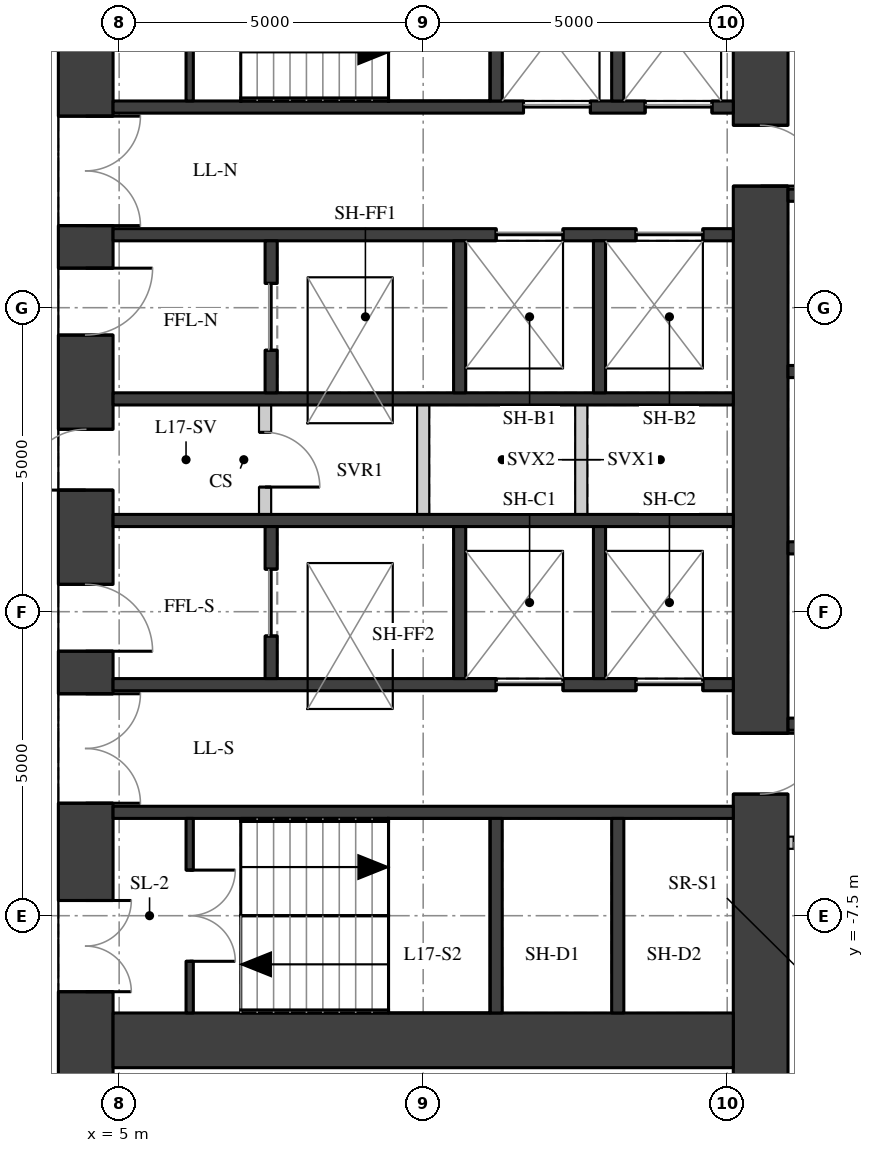
"""IFC4 building model, lengths in metres.
Left out: names, types, materials, properties, quantities, classifications, styles, units other than length and angle.
Written with IfcOpenShell. Run it as: python <this file> out.ifc"""

import sys

from ifc_helpers import new_model, si_unit, direction, frame, frame_2d, origin, place, context, subcontext, project, spatial, rectangle, extrude, element, fill, save


model = new_model("IFC4")
c1 = context("Model", 3, precision=1e-05, world=origin(), true_north=direction((0.0, 1.0)))
c2 = subcontext(c1, "Body", "Model", "MODEL_VIEW")
j1 = project(units=[si_unit("LENGTHUNIT", "METRE"), si_unit("PLANEANGLEUNIT", "RADIAN")], contexts=[c1])
p1 = place(None, origin())
s1 = spatial("IfcSite", under=j1, at=p1, CompositionType="ELEMENT")
p2 = place(p1, origin())
s2 = spatial("IfcBuilding", under=s1, at=p2, CompositionType="ELEMENT")
p3 = place(p2, frame((0.0, 0.0, 64.6)))
s3 = spatial("IfcBuildingStorey", under=s2, at=p3, CompositionType="ELEMENT", Elevation=64.6)
p4 = place(p3, frame((4.45, -11.1, 0.0), z_axis=(0.0, 0.0, 1.0), x_axis=(0.0, 1.0, 0.0)))
e1 = element("IfcWall", 1, at=p4, inside=s3, PredefinedType="SHEAR", context=c2, shape_type="SweptSolid", body=[
    extrude(rectangle(XDim=22.2, YDim=0.9, at=frame_2d((11.1, 0.0))), origin(), (0.0, 0.0, 1.0), 3.02),
])
p5 = place(p4, frame((2.35, 0.0, 0.0)))
e2 = element("IfcOpeningElement", 2, at=p5, cuts=e1, PredefinedType="OPENING", context=c2, shape_type="SweptSolid", body=[
    extrude(rectangle(XDim=1.5, YDim=2.1, at=frame_2d((0.75, 1.05))), frame((0.0, 0.46, 0.0), z_axis=(0.0, -1.0, 0.0), x_axis=(1.0, 0.0, 0.0)), (0.0, 0.0, 1.0), 0.92),
])
p6 = place(p4, frame((5.45, 0.0, 0.0)))
e3 = element("IfcOpeningElement", 3, at=p6, cuts=e1, PredefinedType="OPENING", context=c2, shape_type="SweptSolid", body=[
    extrude(rectangle(XDim=1.8, YDim=2.1, at=frame_2d((0.9, 1.05))), frame((0.0, 0.46, 0.0), z_axis=(0.0, -1.0, 0.0), x_axis=(1.0, 0.0, 0.0)), (0.0, 0.0, 1.0), 0.92),
])
p7 = place(p4, frame((7.95, 0.0, 0.0)))
e4 = element("IfcOpeningElement", 4, at=p7, cuts=e1, PredefinedType="OPENING", context=c2, shape_type="SweptSolid", body=[
    extrude(rectangle(XDim=1.1, YDim=2.1, at=frame_2d((0.55, 1.05))), frame((0.0, 0.46, 0.0), z_axis=(0.0, -1.0, 0.0), x_axis=(1.0, 0.0, 0.0)), (0.0, 0.0, 1.0), 0.92),
])
p8 = place(p4, frame((10.6, 0.0, 0.0)))
e5 = element("IfcOpeningElement", 5, at=p8, cuts=e1, PredefinedType="OPENING", context=c2, shape_type="SweptSolid", body=[
    extrude(rectangle(XDim=1.0, YDim=2.1, at=frame_2d((0.5, 1.05))), frame((0.0, 0.46, 0.0), z_axis=(0.0, -1.0, 0.0), x_axis=(1.0, 0.0, 0.0)), (0.0, 0.0, 1.0), 0.92),
])
p9 = place(p4, frame((13.15, 0.0, 0.0)))
e6 = element("IfcOpeningElement", 6, at=p9, cuts=e1, PredefinedType="OPENING", context=c2, shape_type="SweptSolid", body=[
    extrude(rectangle(XDim=1.1, YDim=2.1, at=frame_2d((0.55, 1.05))), frame((0.0, 0.46, 0.0), z_axis=(0.0, -1.0, 0.0), x_axis=(1.0, 0.0, 0.0)), (0.0, 0.0, 1.0), 0.92),
])
p10 = place(p4, frame((14.95, 0.0, 0.0)))
e7 = element("IfcOpeningElement", 7, at=p10, cuts=e1, PredefinedType="OPENING", context=c2, shape_type="SweptSolid", body=[
    extrude(rectangle(XDim=1.8, YDim=2.1, at=frame_2d((0.9, 1.05))), frame((0.0, 0.46, 0.0), z_axis=(0.0, -1.0, 0.0), x_axis=(1.0, 0.0, 0.0)), (0.0, 0.0, 1.0), 0.92),
])
p11 = place(p4, frame((18.35, 0.0, 0.0)))
e8 = element("IfcOpeningElement", 8, at=p11, cuts=e1, PredefinedType="OPENING", context=c2, shape_type="SweptSolid", body=[
    extrude(rectangle(XDim=1.5, YDim=2.1, at=frame_2d((0.75, 1.05))), frame((0.0, 0.46, 0.0), z_axis=(0.0, -1.0, 0.0), x_axis=(1.0, 0.0, 0.0)), (0.0, 0.0, 1.0), 0.92),
])
p12 = place(p3, frame((15.55, -11.1, 0.0), z_axis=(0.0, 0.0, 1.0), x_axis=(0.0, 1.0, 0.0)))
e9 = element("IfcWall", 9, at=p12, inside=s3, PredefinedType="SHEAR", context=c2, shape_type="SweptSolid", body=[
    extrude(rectangle(XDim=22.2, YDim=0.9, at=frame_2d((11.1, 0.0))), origin(), (0.0, 0.0, 1.0), 3.02),
])
p13 = place(p12, frame((15.6, 0.0, 0.0)))
e10 = element("IfcOpeningElement", 10, at=p13, cuts=e9, PredefinedType="OPENING", context=c2, shape_type="SweptSolid", body=[
    extrude(rectangle(XDim=1.0, YDim=2.1, at=frame_2d((0.5, 1.05))), frame((0.0, 0.46, 0.0), z_axis=(0.0, -1.0, 0.0), x_axis=(1.0, 0.0, 0.0)), (0.0, 0.0, 1.0), 0.92),
])
p14 = place(p12, frame((5.6, 0.0, 0.0)))
e11 = element("IfcOpeningElement", 11, at=p14, cuts=e9, PredefinedType="OPENING", context=c2, shape_type="SweptSolid", body=[
    extrude(rectangle(XDim=1.0, YDim=2.1, at=frame_2d((0.5, 1.05))), frame((0.0, 0.46, 0.0), z_axis=(0.0, -1.0, 0.0), x_axis=(1.0, 0.0, 0.0)), (0.0, 0.0, 1.0), 0.92),
])
p15 = place(p3, frame((4.9, -9.55, 0.0), z_axis=(0.0, 0.0, 1.0), x_axis=(1.0, 0.0, 0.0)))
e12 = element("IfcWall", 12, at=p15, inside=s3, PredefinedType="SHEAR", context=c2, shape_type="SweptSolid", body=[
    extrude(rectangle(XDim=10.2, YDim=0.9, at=frame_2d((5.1, 0.0))), origin(), (0.0, 0.0, 1.0), 3.02),
])
p16 = place(p3, frame((4.9, 5.8, 0.0), z_axis=(0.0, 0.0, 1.0), x_axis=(1.0, 0.0, 0.0)))
e13 = element("IfcWall", 13, at=p16, inside=s3, PredefinedType="SHEAR", context=c2, shape_type="SweptSolid", body=[
    extrude(rectangle(XDim=10.2, YDim=0.2, at=frame_2d((5.1, 0.0))), origin(), (0.0, 0.0, 1.0), 3.02),
])
p17 = place(p16, frame((6.75, 0.0, 0.0)))
e14 = element("IfcOpeningElement", 14, at=p17, cuts=e13, PredefinedType="OPENING", context=c2, shape_type="SweptSolid", body=[
    extrude(rectangle(XDim=1.1, YDim=2.1, at=frame_2d((0.55, 1.05))), frame((0.0, 0.11, 0.0), z_axis=(0.0, -1.0, 0.0), x_axis=(1.0, 0.0, 0.0)), (0.0, 0.0, 1.0), 0.22),
])
p18 = place(p16, frame((8.75, 0.0, 0.0)))
e15 = element("IfcOpeningElement", 15, at=p18, cuts=e13, PredefinedType="OPENING", context=c2, shape_type="SweptSolid", body=[
    extrude(rectangle(XDim=1.1, YDim=2.1, at=frame_2d((0.55, 1.05))), frame((0.0, 0.11, 0.0), z_axis=(0.0, -1.0, 0.0), x_axis=(1.0, 0.0, 0.0)), (0.0, 0.0, 1.0), 0.22),
])
p19 = place(p3, frame((4.9, 3.7, 0.0), z_axis=(0.0, 0.0, 1.0), x_axis=(1.0, 0.0, 0.0)))
e16 = element("IfcWall", 16, at=p19, inside=s3, PredefinedType="SHEAR", context=c2, shape_type="SweptSolid", body=[
    extrude(rectangle(XDim=10.2, YDim=0.2, at=frame_2d((5.1, 0.0))), origin(), (0.0, 0.0, 1.0), 3.02),
])
p20 = place(p19, frame((6.3, 0.0, 0.0)))
e17 = element("IfcOpeningElement", 17, at=p20, cuts=e16, PredefinedType="OPENING", context=c2, shape_type="SweptSolid", body=[
    extrude(rectangle(XDim=1.1, YDim=2.1, at=frame_2d((0.55, 1.05))), frame((0.0, 0.11, 0.0), z_axis=(0.0, -1.0, 0.0), x_axis=(1.0, 0.0, 0.0)), (0.0, 0.0, 1.0), 0.22),
])
p21 = place(p19, frame((8.6, 0.0, 0.0)))
e18 = element("IfcOpeningElement", 18, at=p21, cuts=e16, PredefinedType="OPENING", context=c2, shape_type="SweptSolid", body=[
    extrude(rectangle(XDim=1.1, YDim=2.1, at=frame_2d((0.55, 1.05))), frame((0.0, 0.11, 0.0), z_axis=(0.0, -1.0, 0.0), x_axis=(1.0, 0.0, 0.0)), (0.0, 0.0, 1.0), 0.22),
])
for number, where, z_axis, x_axis in (
    (19, (4.9, 1.0, 0.0), (0.0, 0.0, 1.0), (1.0, 0.0, 0.0)),
    (20, (4.9, -1.0, 0.0), (0.0, 0.0, 1.0), (1.0, 0.0, 0.0)),
):
    element("IfcWall", number, at=place(p3, frame(where, z_axis=z_axis, x_axis=x_axis)), inside=s3, PredefinedType="SHEAR", context=c2, shape_type="SweptSolid", body=[
        extrude(rectangle(XDim=10.2, YDim=0.2, at=frame_2d((5.1, 0.0))), origin(), (0.0, 0.0, 1.0), 3.02),
    ])
p22 = place(p3, frame((4.9, -3.7, 0.0), z_axis=(0.0, 0.0, 1.0), x_axis=(1.0, 0.0, 0.0)))
e21 = element("IfcWall", 21, at=p22, inside=s3, PredefinedType="SHEAR", context=c2, shape_type="SweptSolid", body=[
    extrude(rectangle(XDim=10.2, YDim=0.2, at=frame_2d((5.1, 0.0))), origin(), (0.0, 0.0, 1.0), 3.02),
])
p23 = place(p22, frame((6.3, 0.0, 0.0)))
e22 = element("IfcOpeningElement", 22, at=p23, cuts=e21, PredefinedType="OPENING", context=c2, shape_type="SweptSolid", body=[
    extrude(rectangle(XDim=1.1, YDim=2.1, at=frame_2d((0.55, 1.05))), frame((0.0, 0.11, 0.0), z_axis=(0.0, -1.0, 0.0), x_axis=(1.0, 0.0, 0.0)), (0.0, 0.0, 1.0), 0.22),
])
p24 = place(p22, frame((8.6, 0.0, 0.0)))
e23 = element("IfcOpeningElement", 23, at=p24, cuts=e21, PredefinedType="OPENING", context=c2, shape_type="SweptSolid", body=[
    extrude(rectangle(XDim=1.1, YDim=2.1, at=frame_2d((0.55, 1.05))), frame((0.0, 0.11, 0.0), z_axis=(0.0, -1.0, 0.0), x_axis=(1.0, 0.0, 0.0)), (0.0, 0.0, 1.0), 0.22),
])
p25 = place(p3, frame((4.9, -5.8, 0.0), z_axis=(0.0, 0.0, 1.0), x_axis=(1.0, 0.0, 0.0)))
e24 = element("IfcWall", 24, at=p25, inside=s3, PredefinedType="SHEAR", context=c2, shape_type="SweptSolid", body=[
    extrude(rectangle(XDim=10.2, YDim=0.2, at=frame_2d((5.1, 0.0))), origin(), (0.0, 0.0, 1.0), 3.02),
])
for number, where, z_axis, x_axis in (
    (25, (11.2, 5.9, 0.0), (0.0, 0.0, 1.0), (0.0, 1.0, 0.0)),
    (26, (11.2, -9.1, 0.0), (0.0, 0.0, 1.0), (0.0, 1.0, 0.0)),
    (27, (13.2, 5.9, 0.0), (0.0, 0.0, 1.0), (0.0, 1.0, 0.0)),
    (28, (13.2, -9.1, 0.0), (0.0, 0.0, 1.0), (0.0, 1.0, 0.0)),
):
    element("IfcWall", number, at=place(p3, frame(where, z_axis=z_axis, x_axis=x_axis)), inside=s3, PredefinedType="SHEAR", context=c2, shape_type="SweptSolid", body=[
        extrude(rectangle(XDim=3.2, YDim=0.2, at=frame_2d((1.6, 0.0))), origin(), (0.0, 0.0, 1.0), 3.02),
    ])
p26 = place(p3, frame((7.5, 1.1, 0.0), z_axis=(0.0, 0.0, 1.0), x_axis=(0.0, 1.0, 0.0)))
e29 = element("IfcWall", 29, at=p26, inside=s3, PredefinedType="SHEAR", context=c2, shape_type="SweptSolid", body=[
    extrude(rectangle(XDim=2.5, YDim=0.2, at=frame_2d((1.25, 0.0))), origin(), (0.0, 0.0, 1.0), 3.02),
])
p27 = place(p26, frame((0.7, 0.0, 0.0)))
e30 = element("IfcOpeningElement", 30, at=p27, cuts=e29, PredefinedType="OPENING", context=c2, shape_type="SweptSolid", body=[
    extrude(rectangle(XDim=1.1, YDim=2.1, at=frame_2d((0.55, 1.05))), frame((0.0, 0.11, 0.0), z_axis=(0.0, -1.0, 0.0), x_axis=(1.0, 0.0, 0.0)), (0.0, 0.0, 1.0), 0.22),
])
p28 = place(p3, frame((7.5, -3.6, 0.0), z_axis=(0.0, 0.0, 1.0), x_axis=(0.0, 1.0, 0.0)))
e31 = element("IfcWall", 31, at=p28, inside=s3, PredefinedType="SHEAR", context=c2, shape_type="SweptSolid", body=[
    extrude(rectangle(XDim=2.5, YDim=0.2, at=frame_2d((1.25, 0.0))), origin(), (0.0, 0.0, 1.0), 3.02),
])
p29 = place(p28, frame((0.7, 0.0, 0.0)))
e32 = element("IfcOpeningElement", 32, at=p29, cuts=e31, PredefinedType="OPENING", context=c2, shape_type="SweptSolid", body=[
    extrude(rectangle(XDim=1.1, YDim=2.1, at=frame_2d((0.55, 1.05))), frame((0.0, 0.11, 0.0), z_axis=(0.0, -1.0, 0.0), x_axis=(1.0, 0.0, 0.0)), (0.0, 0.0, 1.0), 0.22),
])
for number, where, z_axis, x_axis in (
    (33, (10.6, 1.1, 0.0), (0.0, 0.0, 1.0), (0.0, 1.0, 0.0)),
    (34, (10.6, -3.6, 0.0), (0.0, 0.0, 1.0), (0.0, 1.0, 0.0)),
    (35, (12.9, 1.1, 0.0), (0.0, 0.0, 1.0), (0.0, 1.0, 0.0)),
    (36, (12.9, -3.6, 0.0), (0.0, 0.0, 1.0), (0.0, 1.0, 0.0)),
):
    element("IfcWall", number, at=place(p3, frame(where, z_axis=z_axis, x_axis=x_axis)), inside=s3, PredefinedType="SHEAR", context=c2, shape_type="SweptSolid", body=[
        extrude(rectangle(XDim=2.5, YDim=0.2, at=frame_2d((1.25, 0.0))), origin(), (0.0, 0.0, 1.0), 3.02),
    ])
p30 = place(p3, frame((6.16, 5.9, 0.0), z_axis=(0.0, 0.0, 1.0), x_axis=(0.0, 1.0, 0.0)))
e37 = element("IfcWall", 37, at=p30, inside=s3, PredefinedType="SHEAR", context=c2, shape_type="SweptSolid", body=[
    extrude(rectangle(XDim=3.2, YDim=0.12, at=frame_2d((1.6, 0.0))), origin(), (0.0, 0.0, 1.0), 3.02),
])
p31 = place(p30, frame((0.85, 0.0, 0.0)))
e38 = element("IfcOpeningElement", 38, at=p31, cuts=e37, PredefinedType="OPENING", context=c2, shape_type="SweptSolid", body=[
    extrude(rectangle(XDim=1.5, YDim=2.1, at=frame_2d((0.75, 1.05))), frame((0.0, 0.07, 0.0), z_axis=(0.0, -1.0, 0.0), x_axis=(1.0, 0.0, 0.0)), (0.0, 0.0, 1.0), 0.14),
])
p32 = place(p3, frame((6.16, -9.1, 0.0), z_axis=(0.0, 0.0, 1.0), x_axis=(0.0, 1.0, 0.0)))
e39 = element("IfcWall", 39, at=p32, inside=s3, PredefinedType="SHEAR", context=c2, shape_type="SweptSolid", body=[
    extrude(rectangle(XDim=3.2, YDim=0.12, at=frame_2d((1.6, 0.0))), origin(), (0.0, 0.0, 1.0), 3.02),
])
p33 = place(p32, frame((0.85, 0.0, 0.0)))
e40 = element("IfcOpeningElement", 40, at=p33, cuts=e39, PredefinedType="OPENING", context=c2, shape_type="SweptSolid", body=[
    extrude(rectangle(XDim=1.5, YDim=2.1, at=frame_2d((0.75, 1.05))), frame((0.0, 0.07, 0.0), z_axis=(0.0, -1.0, 0.0), x_axis=(1.0, 0.0, 0.0)), (0.0, 0.0, 1.0), 0.14),
])
p34 = place(p3, frame((7.4, -0.9, 0.0), z_axis=(0.0, 0.0, 1.0), x_axis=(0.0, 1.0, 0.0)))
e41 = element("IfcWall", 41, at=p34, inside=s3, PredefinedType="PARTITIONING", context=c2, shape_type="SweptSolid", body=[
    extrude(rectangle(XDim=1.8, YDim=0.2, at=frame_2d((0.9, 0.0))), origin(), (0.0, 0.0, 1.0), 3.02),
])
p35 = place(p34, frame((0.45, 0.0, 0.0)))
e42 = element("IfcOpeningElement", 42, at=p35, cuts=e41, PredefinedType="OPENING", context=c2, shape_type="SweptSolid", body=[
    extrude(rectangle(XDim=0.9, YDim=2.1, at=frame_2d((0.45, 1.05))), frame((0.0, 0.11, 0.0), z_axis=(0.0, -1.0, 0.0), x_axis=(1.0, 0.0, 0.0)), (0.0, 0.0, 1.0), 0.22),
])
for number, where, z_axis, x_axis in (
    (43, (10.0, -0.9, 0.0), (0.0, 0.0, 1.0), (0.0, 1.0, 0.0)),
    (44, (12.6, -0.9, 0.0), (0.0, 0.0, 1.0), (0.0, 1.0, 0.0)),
):
    element("IfcWall", number, at=place(p3, frame(where, z_axis=z_axis, x_axis=x_axis)), inside=s3, PredefinedType="PARTITIONING", context=c2, shape_type="SweptSolid", body=[
        extrude(rectangle(XDim=1.8, YDim=0.2, at=frame_2d((0.9, 0.0))), origin(), (0.0, 0.0, 1.0), 3.02),
    ])
for number, where, z_axis, x_axis in (
    (45, (16.0, -4.35, 0.0), (0.0, 0.0, 1.0), (1.0, 0.0, 0.0)),
    (46, (16.0, -1.45, 0.0), (0.0, 0.0, 1.0), (1.0, 0.0, 0.0)),
    (47, (16.0, 1.45, 0.0), (0.0, 0.0, 1.0), (1.0, 0.0, 0.0)),
    (48, (16.0, 4.35, 0.0), (0.0, 0.0, 1.0), (1.0, 0.0, 0.0)),
):
    element("IfcWall", number, at=place(p3, frame(where, z_axis=z_axis, x_axis=x_axis)), inside=s3, PredefinedType="SHEAR", context=c2, shape_type="SweptSolid", body=[
        extrude(rectangle(XDim=2.3, YDim=0.2, at=frame_2d((1.15, 0.0))), origin(), (0.0, 0.0, 1.0), 3.02),
    ])
p36 = place(p3, frame((16.0, -6.3, 0.0), z_axis=(0.0, 0.0, 1.0), x_axis=(1.0, 0.0, 0.0)))
e49 = element("IfcWall", 49, at=p36, inside=s3, PredefinedType="PARTITIONING", context=c2, shape_type="SweptSolid", body=[
    extrude(rectangle(XDim=2.3, YDim=0.2, at=frame_2d((1.15, 0.0))), origin(), (0.0, 0.0, 1.0), 3.02),
])
p37 = place(p36, frame((0.1, 0.0, 0.0)))
e50 = element("IfcOpeningElement", 50, at=p37, cuts=e49, PredefinedType="OPENING", context=c2, shape_type="SweptSolid", body=[
    extrude(rectangle(XDim=0.9, YDim=2.1, at=frame_2d((0.45, 1.05))), frame((0.0, 0.11, 0.0), z_axis=(0.0, -1.0, 0.0), x_axis=(1.0, 0.0, 0.0)), (0.0, 0.0, 1.0), 0.22),
])
p38 = place(p5, origin())
e51 = element("IfcDoor", 51, at=p38, inside=s3, OperationType="DOUBLE_DOOR_SINGLE_SWING", PredefinedType="DOOR", context=c2, shape_type="SweptSolid", body=[
    extrude(rectangle(XDim=1.5, YDim=2.1, at=frame_2d((0.75, 1.05))), frame((0.0, 0.025, 0.0), z_axis=(0.0, -1.0, 0.0), x_axis=(1.0, 0.0, 0.0)), (0.0, 0.0, 1.0), 0.05),
])
fill(e2, e51)
p39 = place(p6, origin())
e52 = element("IfcDoor", 52, at=p39, inside=s3, OperationType="DOUBLE_DOOR_SINGLE_SWING", PredefinedType="DOOR", context=c2, shape_type="SweptSolid", body=[
    extrude(rectangle(XDim=1.8, YDim=2.1, at=frame_2d((0.9, 1.05))), frame((0.0, 0.025, 0.0), z_axis=(0.0, -1.0, 0.0), x_axis=(1.0, 0.0, 0.0)), (0.0, 0.0, 1.0), 0.05),
])
fill(e3, e52)
p40 = place(p7, origin())
e53 = element("IfcDoor", 53, at=p40, inside=s3, OperationType="SINGLE_SWING_RIGHT", PredefinedType="DOOR", context=c2, shape_type="SweptSolid", body=[
    extrude(rectangle(XDim=1.1, YDim=2.1, at=frame_2d((0.55, 1.05))), frame((0.0, 0.025, 0.0), z_axis=(0.0, -1.0, 0.0), x_axis=(1.0, 0.0, 0.0)), (0.0, 0.0, 1.0), 0.05),
])
fill(e4, e53)
p41 = place(p8, origin())
e54 = element("IfcDoor", 54, at=p41, inside=s3, OperationType="SINGLE_SWING_LEFT", PredefinedType="DOOR", context=c2, shape_type="SweptSolid", body=[
    extrude(rectangle(XDim=1.0, YDim=2.1, at=frame_2d((0.5, 1.05))), frame((0.0, 0.025, 0.0), z_axis=(0.0, -1.0, 0.0), x_axis=(1.0, 0.0, 0.0)), (0.0, 0.0, 1.0), 0.05),
])
fill(e5, e54)
p42 = place(p9, origin())
e55 = element("IfcDoor", 55, at=p42, inside=s3, OperationType="SINGLE_SWING_LEFT", PredefinedType="DOOR", context=c2, shape_type="SweptSolid", body=[
    extrude(rectangle(XDim=1.1, YDim=2.1, at=frame_2d((0.55, 1.05))), frame((0.0, 0.025, 0.0), z_axis=(0.0, -1.0, 0.0), x_axis=(1.0, 0.0, 0.0)), (0.0, 0.0, 1.0), 0.05),
])
fill(e6, e55)
p43 = place(p10, origin())
e56 = element("IfcDoor", 56, at=p43, inside=s3, OperationType="DOUBLE_DOOR_SINGLE_SWING", PredefinedType="DOOR", context=c2, shape_type="SweptSolid", body=[
    extrude(rectangle(XDim=1.8, YDim=2.1, at=frame_2d((0.9, 1.05))), frame((0.0, 0.025, 0.0), z_axis=(0.0, -1.0, 0.0), x_axis=(1.0, 0.0, 0.0)), (0.0, 0.0, 1.0), 0.05),
])
fill(e7, e56)
p44 = place(p33, origin())
e57 = element("IfcDoor", 57, at=p44, inside=s3, OperationType="DOUBLE_DOOR_SINGLE_SWING", PredefinedType="DOOR", context=c2, shape_type="SweptSolid", body=[
    extrude(rectangle(XDim=1.5, YDim=2.1, at=frame_2d((0.75, 1.05))), frame((0.0, 0.025, 0.0), z_axis=(0.0, -1.0, 0.0), x_axis=(1.0, 0.0, 0.0)), (0.0, 0.0, 1.0), 0.05),
])
fill(e40, e57)
p45 = place(p17, origin())
e58 = element("IfcDoor", 58, at=p45, inside=s3, OperationType="DOUBLE_DOOR_SLIDING", PredefinedType="DOOR", context=c2, shape_type="SweptSolid", body=[
    extrude(rectangle(XDim=1.1, YDim=2.1, at=frame_2d((0.55, 1.05))), frame((0.0, 0.025, 0.0), z_axis=(0.0, -1.0, 0.0), x_axis=(1.0, 0.0, 0.0)), (0.0, 0.0, 1.0), 0.05),
])
fill(e14, e58)
p46 = place(p18, origin())
e59 = element("IfcDoor", 59, at=p46, inside=s3, OperationType="DOUBLE_DOOR_SLIDING", PredefinedType="DOOR", context=c2, shape_type="SweptSolid", body=[
    extrude(rectangle(XDim=1.1, YDim=2.1, at=frame_2d((0.55, 1.05))), frame((0.0, 0.025, 0.0), z_axis=(0.0, -1.0, 0.0), x_axis=(1.0, 0.0, 0.0)), (0.0, 0.0, 1.0), 0.05),
])
fill(e15, e59)
p47 = place(p20, origin())
e60 = element("IfcDoor", 60, at=p47, inside=s3, OperationType="DOUBLE_DOOR_SLIDING", PredefinedType="DOOR", context=c2, shape_type="SweptSolid", body=[
    extrude(rectangle(XDim=1.1, YDim=2.1, at=frame_2d((0.55, 1.05))), frame((0.0, 0.025, 0.0), z_axis=(0.0, -1.0, 0.0), x_axis=(1.0, 0.0, 0.0)), (0.0, 0.0, 1.0), 0.05),
])
fill(e17, e60)
p48 = place(p21, origin())
e61 = element("IfcDoor", 61, at=p48, inside=s3, OperationType="DOUBLE_DOOR_SLIDING", PredefinedType="DOOR", context=c2, shape_type="SweptSolid", body=[
    extrude(rectangle(XDim=1.1, YDim=2.1, at=frame_2d((0.55, 1.05))), frame((0.0, 0.025, 0.0), z_axis=(0.0, -1.0, 0.0), x_axis=(1.0, 0.0, 0.0)), (0.0, 0.0, 1.0), 0.05),
])
fill(e18, e61)
p49 = place(p23, origin())
e62 = element("IfcDoor", 62, at=p49, inside=s3, OperationType="DOUBLE_DOOR_SLIDING", PredefinedType="DOOR", context=c2, shape_type="SweptSolid", body=[
    extrude(rectangle(XDim=1.1, YDim=2.1, at=frame_2d((0.55, 1.05))), frame((0.0, 0.025, 0.0), z_axis=(0.0, -1.0, 0.0), x_axis=(1.0, 0.0, 0.0)), (0.0, 0.0, 1.0), 0.05),
])
fill(e22, e62)
p50 = place(p24, origin())
e63 = element("IfcDoor", 63, at=p50, inside=s3, OperationType="DOUBLE_DOOR_SLIDING", PredefinedType="DOOR", context=c2, shape_type="SweptSolid", body=[
    extrude(rectangle(XDim=1.1, YDim=2.1, at=frame_2d((0.55, 1.05))), frame((0.0, 0.025, 0.0), z_axis=(0.0, -1.0, 0.0), x_axis=(1.0, 0.0, 0.0)), (0.0, 0.0, 1.0), 0.05),
])
fill(e23, e63)
p51 = place(p27, origin())
e64 = element("IfcDoor", 64, at=p51, inside=s3, OperationType="DOUBLE_DOOR_SLIDING", PredefinedType="DOOR", context=c2, shape_type="SweptSolid", body=[
    extrude(rectangle(XDim=1.1, YDim=2.1, at=frame_2d((0.55, 1.05))), frame((0.0, 0.025, 0.0), z_axis=(0.0, -1.0, 0.0), x_axis=(1.0, 0.0, 0.0)), (0.0, 0.0, 1.0), 0.05),
])
fill(e30, e64)
p52 = place(p29, origin())
e65 = element("IfcDoor", 65, at=p52, inside=s3, OperationType="DOUBLE_DOOR_SLIDING", PredefinedType="DOOR", context=c2, shape_type="SweptSolid", body=[
    extrude(rectangle(XDim=1.1, YDim=2.1, at=frame_2d((0.55, 1.05))), frame((0.0, 0.025, 0.0), z_axis=(0.0, -1.0, 0.0), x_axis=(1.0, 0.0, 0.0)), (0.0, 0.0, 1.0), 0.05),
])
fill(e32, e65)
p53 = place(p35, origin())
e66 = element("IfcDoor", 66, at=p53, inside=s3, OperationType="SINGLE_SWING_RIGHT", PredefinedType="DOOR", context=c2, shape_type="SweptSolid", body=[
    extrude(rectangle(XDim=0.9, YDim=2.1, at=frame_2d((0.45, 1.05))), frame((0.0, 0.025, 0.0), z_axis=(0.0, -1.0, 0.0), x_axis=(1.0, 0.0, 0.0)), (0.0, 0.0, 1.0), 0.05),
])
fill(e42, e66)
p54 = place(p13, origin())
e67 = element("IfcDoor", 67, at=p54, inside=s3, OperationType="SINGLE_SWING_RIGHT", PredefinedType="DOOR", context=c2, shape_type="SweptSolid", body=[
    extrude(rectangle(XDim=1.0, YDim=2.1, at=frame_2d((0.5, 1.05))), frame((0.0, 0.025, 0.0), z_axis=(0.0, -1.0, 0.0), x_axis=(1.0, 0.0, 0.0)), (0.0, 0.0, 1.0), 0.05),
])
fill(e10, e67)
p55 = place(p14, origin())
e68 = element("IfcDoor", 68, at=p55, inside=s3, OperationType="SINGLE_SWING_LEFT", PredefinedType="DOOR", context=c2, shape_type="SweptSolid", body=[
    extrude(rectangle(XDim=1.0, YDim=2.1, at=frame_2d((0.5, 1.05))), frame((0.0, 0.025, 0.0), z_axis=(0.0, -1.0, 0.0), x_axis=(1.0, 0.0, 0.0)), (0.0, 0.0, 1.0), 0.05),
])
fill(e11, e68)
save(model, sys.argv[1])
